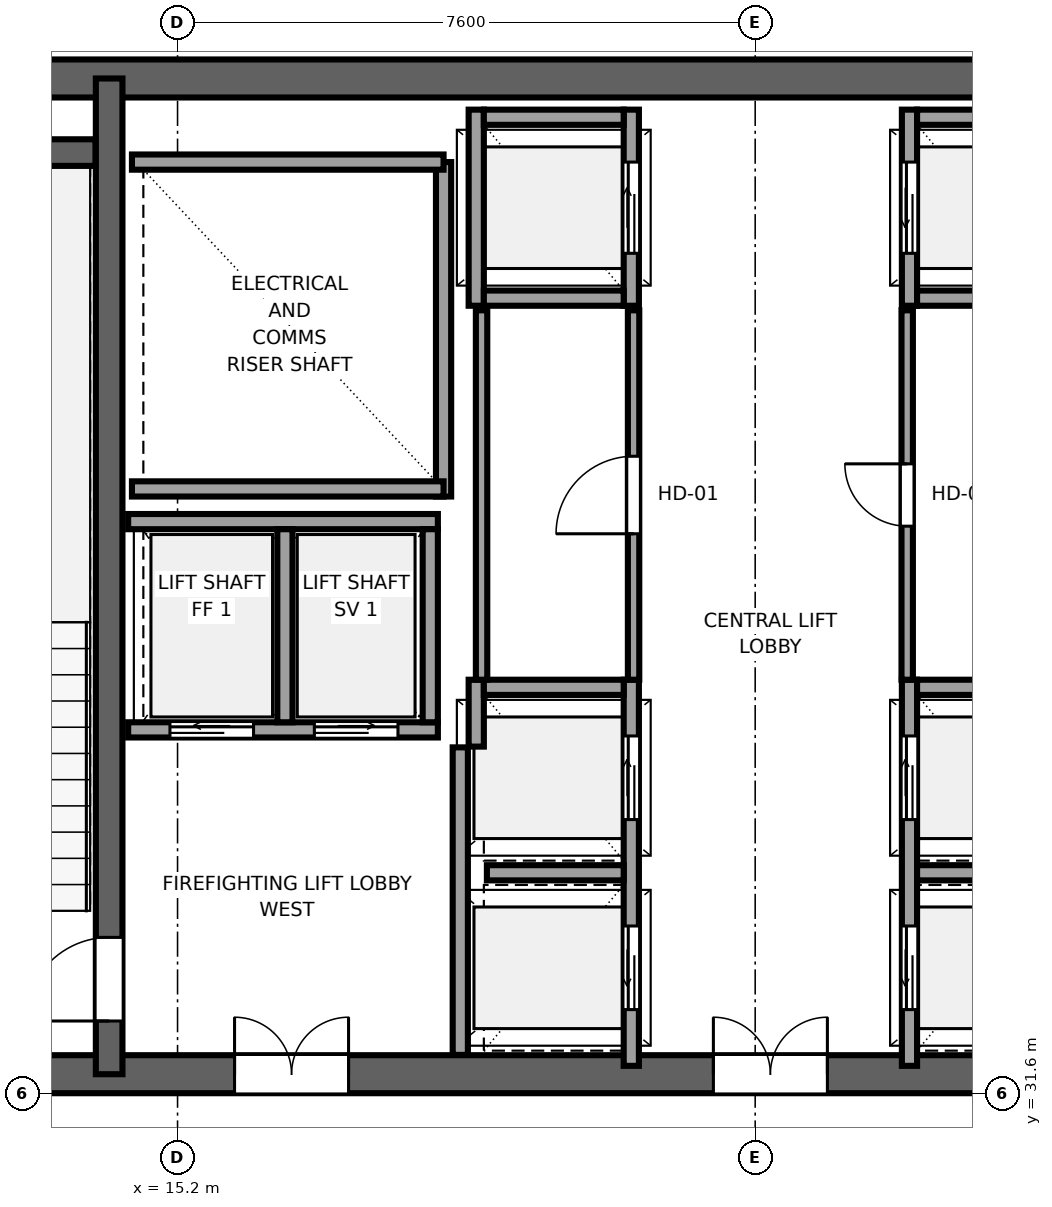
"""IFC4 building model, lengths in metres.
Left out: names, types, materials, properties, quantities, classifications, styles, units other than length and angle.
Written with IfcOpenShell. Run it as: python <this file> out.ifc"""

import sys

from ifc_helpers import new_model, si_unit, direction, frame, frame_2d, origin, place, context, subcontext, project, spatial, rectangle, extrude, source, transform, mapped, element, fill, save


model = new_model("IFC4")
c1 = context("Model", 3, precision=1e-05, world=origin(), true_north=direction((0.0, 1.0)))
c2 = subcontext(c1, "Body", "Model", "MODEL_VIEW")
j1 = project(units=[si_unit("LENGTHUNIT", "METRE"), si_unit("PLANEANGLEUNIT", "RADIAN")], contexts=[c1])
p1 = place(None, origin())
s1 = spatial("IfcSite", under=j1, at=p1, CompositionType="ELEMENT")
p2 = place(p1, origin())
s2 = spatial("IfcBuilding", under=s1, at=p2, CompositionType="ELEMENT")
p3 = place(p2, frame((0.0, 0.0, 282.15)))
s3 = spatial("IfcBuildingStorey", under=s2, at=p3, CompositionType="ELEMENT", Elevation=282.15)
p4 = place(p3, frame((10.0, 31.85, 0.0), z_axis=(0.0, 0.0, 1.0), x_axis=(1.0, 0.0, 0.0)))
e1 = element("IfcWall", 1, at=p4, inside=s3, PredefinedType="SHEAR", context=c2, shape_type="SweptSolid", body=[
    extrude(rectangle(XDim=26.0, YDim=0.5, at=frame_2d((13.0, 0.0))), origin(), (0.0, 0.0, 1.0), 4.4),
])
p5 = place(p4, frame((7.45, 0.0, 0.0), z_axis=(0.0, 0.0, 1.0), x_axis=(-1.0, 0.0, 0.0)))
e2 = element("IfcOpeningElement", 2, at=p5, cuts=e1, PredefinedType="OPENING", context=c2, shape_type="SweptSolid", body=[
    extrude(rectangle(XDim=1.5, YDim=2.04, at=frame_2d((0.75, 1.02))), frame((0.0, 0.26, 0.0), z_axis=(0.0, -1.0, 0.0), x_axis=(1.0, 0.0, 0.0)), (0.0, 0.0, 1.0), 0.52),
])
p6 = place(p4, frame((13.75, 0.0, 0.0), z_axis=(0.0, 0.0, 1.0), x_axis=(-1.0, 0.0, 0.0)))
e3 = element("IfcOpeningElement", 3, at=p6, cuts=e1, PredefinedType="OPENING", context=c2, shape_type="SweptSolid", body=[
    extrude(rectangle(XDim=1.5, YDim=2.04, at=frame_2d((0.75, 1.02))), frame((0.0, 0.26, 0.0), z_axis=(0.0, -1.0, 0.0), x_axis=(1.0, 0.0, 0.0)), (0.0, 0.0, 1.0), 0.52),
])
p7 = place(p4, frame((20.05, 0.0, 0.0), z_axis=(0.0, 0.0, 1.0), x_axis=(-1.0, 0.0, 0.0)))
e4 = element("IfcOpeningElement", 4, at=p7, cuts=e1, PredefinedType="OPENING", context=c2, shape_type="SweptSolid", body=[
    extrude(rectangle(XDim=1.5, YDim=2.04, at=frame_2d((0.75, 1.02))), frame((0.0, 0.26, 0.0), z_axis=(0.0, -1.0, 0.0), x_axis=(1.0, 0.0, 0.0)), (0.0, 0.0, 1.0), 0.52),
])
p8 = place(p3, frame((10.0, 44.95, 0.0), z_axis=(0.0, 0.0, 1.0), x_axis=(1.0, 0.0, 0.0)))
e5 = element("IfcWall", 5, at=p8, inside=s3, PredefinedType="SHEAR", context=c2, shape_type="SweptSolid", body=[
    extrude(rectangle(XDim=26.0, YDim=0.5, at=frame_2d((13.0, 0.0))), origin(), (0.0, 0.0, 1.0), 4.4),
])
p9 = place(p3, frame((14.3, 31.85, 0.0), z_axis=(0.0, 0.0, 1.0), x_axis=(0.0, 1.0, 0.0)))
e6 = element("IfcWall", 6, at=p9, inside=s3, PredefinedType="SHEAR", context=c2, shape_type="SweptSolid", body=[
    extrude(rectangle(XDim=13.1, YDim=0.35, at=frame_2d((6.55, 0.0))), origin(), (0.0, 0.0, 1.0), 4.4),
])
p10 = place(p9, frame((0.7, 0.0, 0.0)))
e7 = element("IfcOpeningElement", 7, at=p10, cuts=e6, PredefinedType="OPENING", context=c2, shape_type="SweptSolid", body=[
    extrude(rectangle(XDim=1.1, YDim=2.12, at=frame_2d((0.55, 1.06))), frame((0.0, 0.185, 0.0), z_axis=(0.0, -1.0, 0.0), x_axis=(1.0, 0.0, 0.0)), (0.0, 0.0, 1.0), 0.37),
])
p11 = place(p3, frame((10.52, 43.975, 0.0), z_axis=(0.0, 0.0, 1.0), x_axis=(1.0, 0.0, 0.0)))
e8 = element("IfcWall", 8, at=p11, inside=s3, PredefinedType="SHEAR", context=c2, shape_type="SweptSolid", body=[
    extrude(rectangle(XDim=3.6, YDim=0.35, at=frame_2d((1.8, 0.0))), origin(), (0.0, 0.0, 1.0), 4.4),
])
p12 = place(p3, frame((18.7, 39.45, 0.0), z_axis=(0.0, 0.0, 1.0), x_axis=(0.0, 1.0, 0.0)))
e9 = element("IfcWall", 9, at=p12, inside=s3, PredefinedType="SOLIDWALL", context=c2, shape_type="SweptSolid", body=[
    extrude(rectangle(XDim=4.4, YDim=0.2, at=frame_2d((2.2, 0.0))), origin(), (0.0, 0.0, 1.0), 4.18),
])
for number, where, z_axis, x_axis in (
    (10, (14.6, 39.55, 0.0), (0.0, 0.0, 1.0), (1.0, 0.0, 0.0)),
    (11, (14.6, 43.85, 0.0), (0.0, 0.0, 1.0), (1.0, 0.0, 0.0)),
):
    element("IfcWall", number, at=place(p3, frame(where, z_axis=z_axis, x_axis=x_axis)), inside=s3, PredefinedType="SOLIDWALL", context=c2, shape_type="SweptSolid", body=[
        extrude(rectangle(XDim=4.1, YDim=0.2, at=frame_2d((2.05, 0.0))), origin(), (0.0, 0.0, 1.0), 4.18),
    ])
p13 = place(p3, frame((18.92, 32.104, 0.0), z_axis=(0.0, 0.0, 1.0), x_axis=(0.0, 1.0, 0.0)))
e12 = element("IfcWall", 12, at=p13, inside=s3, PredefinedType="SOLIDWALL", context=c2, shape_type="SweptSolid", body=[
    extrude(rectangle(XDim=4.046, YDim=0.2, at=frame_2d((2.023, 0.0))), origin(), (0.0, 0.0, 1.0), 4.18),
])
p14 = place(p3, frame((21.17, 31.96, 0.0), z_axis=(0.0, 0.0, 1.0), x_axis=(0.0, 1.0, 0.0)))
e13 = element("IfcWall", 13, at=p14, inside=s3, PredefinedType="SOLIDWALL", context=c2, shape_type="SweptSolid", body=[
    extrude(rectangle(XDim=5.08, YDim=0.2, at=frame_2d((2.54, 0.0))), origin(), (0.0, 0.0, 1.0), 4.18),
])
p15 = place(p14, frame((0.74, 0.0, 0.0)))
e14 = element("IfcOpeningElement", 14, at=p15, cuts=e13, PredefinedType="OPENING", context=c2, shape_type="SweptSolid", body=[
    extrude(rectangle(XDim=1.1, YDim=2.12, at=frame_2d((0.55, 1.06))), frame((0.0, 0.11, 0.0), z_axis=(0.0, -1.0, 0.0), x_axis=(1.0, 0.0, 0.0)), (0.0, 0.0, 1.0), 0.22),
])
p16 = place(p14, frame((3.24, 0.0, 0.0)))
e15 = element("IfcOpeningElement", 15, at=p16, cuts=e13, PredefinedType="OPENING", context=c2, shape_type="SweptSolid", body=[
    extrude(rectangle(XDim=1.1, YDim=2.12, at=frame_2d((0.55, 1.06))), frame((0.0, 0.11, 0.0), z_axis=(0.0, -1.0, 0.0), x_axis=(1.0, 0.0, 0.0)), (0.0, 0.0, 1.0), 0.22),
])
p17 = place(p3, frame((19.13, 36.16, 0.0), z_axis=(0.0, 0.0, 1.0), x_axis=(0.0, 1.0, 0.0)))
e16 = element("IfcWall", 16, at=p17, inside=s3, PredefinedType="SOLIDWALL", context=c2, shape_type="SweptSolid", body=[
    extrude(rectangle(XDim=0.88, YDim=0.2, at=frame_2d((0.44, 0.0))), origin(), (0.0, 0.0, 1.0), 4.18),
])
p18 = place(p3, frame((19.23, 36.94, 0.0), z_axis=(0.0, 0.0, 1.0), x_axis=(1.0, 0.0, 0.0)))
e17 = element("IfcWall", 17, at=p18, inside=s3, PredefinedType="SOLIDWALL", context=c2, shape_type="SweptSolid", body=[
    extrude(rectangle(XDim=1.84, YDim=0.2, at=frame_2d((0.92, 0.0))), origin(), (0.0, 0.0, 1.0), 4.18),
])
p19 = place(p3, frame((19.27, 34.5, 0.0), z_axis=(0.0, 0.0, 1.0), x_axis=(1.0, 0.0, 0.0)))
e18 = element("IfcWall", 18, at=p19, inside=s3, PredefinedType="SOLIDWALL", context=c2, shape_type="SweptSolid", body=[
    extrude(rectangle(XDim=1.8, YDim=0.2, at=frame_2d((0.9, 0.0))), origin(), (0.0, 0.0, 1.0), 4.18),
])
p20 = place(p3, frame((21.17, 41.96, 0.0), z_axis=(0.0, 0.0, 1.0), x_axis=(0.0, 1.0, 0.0)))
e19 = element("IfcWall", 19, at=p20, inside=s3, PredefinedType="SOLIDWALL", context=c2, shape_type="SweptSolid", body=[
    extrude(rectangle(XDim=2.58, YDim=0.2, at=frame_2d((1.29, 0.0))), origin(), (0.0, 0.0, 1.0), 4.18),
])
p21 = place(p20, frame((0.69, 0.0, 0.0)))
e20 = element("IfcOpeningElement", 20, at=p21, cuts=e19, PredefinedType="OPENING", context=c2, shape_type="SweptSolid", body=[
    extrude(rectangle(XDim=1.2, YDim=2.15, at=frame_2d((0.6, 1.075))), frame((0.0, 0.11, 0.0), z_axis=(0.0, -1.0, 0.0), x_axis=(1.0, 0.0, 0.0)), (0.0, 0.0, 1.0), 0.22),
])
p22 = place(p3, frame((19.13, 41.96, 0.0), z_axis=(0.0, 0.0, 1.0), x_axis=(0.0, 1.0, 0.0)))
e21 = element("IfcWall", 21, at=p22, inside=s3, PredefinedType="SOLIDWALL", context=c2, shape_type="SweptSolid", body=[
    extrude(rectangle(XDim=2.58, YDim=0.2, at=frame_2d((1.29, 0.0))), origin(), (0.0, 0.0, 1.0), 4.18),
])
for number, where, z_axis, x_axis in (
    (22, (19.23, 42.06, 0.0), (0.0, 0.0, 1.0), (1.0, 0.0, 0.0)),
    (23, (19.23, 44.44, 0.0), (0.0, 0.0, 1.0), (1.0, 0.0, 0.0)),
):
    element("IfcWall", number, at=place(p3, frame(where, z_axis=z_axis, x_axis=x_axis)), inside=s3, PredefinedType="SOLIDWALL", context=c2, shape_type="SweptSolid", body=[
        extrude(rectangle(XDim=1.84, YDim=0.2, at=frame_2d((0.92, 0.0))), origin(), (0.0, 0.0, 1.0), 4.18),
    ])
p23 = place(p3, frame((14.55, 36.38, 0.0), z_axis=(0.0, 0.0, 1.0), x_axis=(1.0, 0.0, 0.0)))
e24 = element("IfcWall", 24, at=p23, inside=s3, PredefinedType="SOLIDWALL", context=c2, shape_type="SweptSolid", body=[
    extrude(rectangle(XDim=4.075, YDim=0.2, at=frame_2d((2.038, 0.0))), origin(), (0.0, 0.0, 1.0), 4.18),
])
p24 = place(p23, frame((0.55, 0.0, 0.0)))
e25 = element("IfcOpeningElement", 25, at=p24, cuts=e24, PredefinedType="OPENING", context=c2, shape_type="SweptSolid", body=[
    extrude(rectangle(XDim=1.1, YDim=2.12, at=frame_2d((0.55, 1.06))), frame((0.0, 0.11, 0.0), z_axis=(0.0, -1.0, 0.0), x_axis=(1.0, 0.0, 0.0)), (0.0, 0.0, 1.0), 0.22),
])
p25 = place(p23, frame((2.45, 0.0, 0.0)))
e26 = element("IfcOpeningElement", 26, at=p25, cuts=e24, PredefinedType="OPENING", context=c2, shape_type="SweptSolid", body=[
    extrude(rectangle(XDim=1.1, YDim=2.12, at=frame_2d((0.55, 1.06))), frame((0.0, 0.11, 0.0), z_axis=(0.0, -1.0, 0.0), x_axis=(1.0, 0.0, 0.0)), (0.0, 0.0, 1.0), 0.22),
])
p26 = place(p3, frame((14.55, 39.12, 0.0), z_axis=(0.0, 0.0, 1.0), x_axis=(1.0, 0.0, 0.0)))
e27 = element("IfcWall", 27, at=p26, inside=s3, PredefinedType="SOLIDWALL", context=c2, shape_type="SweptSolid", body=[
    extrude(rectangle(XDim=4.075, YDim=0.2, at=frame_2d((2.038, 0.0))), origin(), (0.0, 0.0, 1.0), 4.18),
])
for number, where, z_axis, x_axis in (
    (28, (18.525, 36.48, 0.0), (0.0, 0.0, 1.0), (0.0, 1.0, 0.0)),
    (29, (16.613, 36.48, 0.0), (0.0, 0.0, 1.0), (0.0, 1.0, 0.0)),
):
    element("IfcWall", number, at=place(p3, frame(where, z_axis=z_axis, x_axis=x_axis)), inside=s3, PredefinedType="SOLIDWALL", context=c2, shape_type="SweptSolid", body=[
        extrude(rectangle(XDim=2.54, YDim=0.2, at=frame_2d((1.27, 0.0))), origin(), (0.0, 0.0, 1.0), 4.18),
    ])
p27 = place(p3, frame((24.83, 31.96, 0.0), z_axis=(0.0, 0.0, 1.0), x_axis=(0.0, 1.0, 0.0)))
e30 = element("IfcWall", 30, at=p27, inside=s3, PredefinedType="SOLIDWALL", context=c2, shape_type="SweptSolid", body=[
    extrude(rectangle(XDim=5.08, YDim=0.2, at=frame_2d((2.54, 0.0))), origin(), (0.0, 0.0, 1.0), 4.18),
])
p28 = place(p27, frame((0.74, 0.0, 0.0)))
e31 = element("IfcOpeningElement", 31, at=p28, cuts=e30, PredefinedType="OPENING", context=c2, shape_type="SweptSolid", body=[
    extrude(rectangle(XDim=1.1, YDim=2.12, at=frame_2d((0.55, 1.06))), frame((0.0, 0.11, 0.0), z_axis=(0.0, -1.0, 0.0), x_axis=(1.0, 0.0, 0.0)), (0.0, 0.0, 1.0), 0.22),
])
p29 = place(p27, frame((3.24, 0.0, 0.0)))
e32 = element("IfcOpeningElement", 32, at=p29, cuts=e30, PredefinedType="OPENING", context=c2, shape_type="SweptSolid", body=[
    extrude(rectangle(XDim=1.1, YDim=2.12, at=frame_2d((0.55, 1.06))), frame((0.0, 0.11, 0.0), z_axis=(0.0, -1.0, 0.0), x_axis=(1.0, 0.0, 0.0)), (0.0, 0.0, 1.0), 0.22),
])
p30 = place(p3, frame((24.93, 36.94, 0.0), z_axis=(0.0, 0.0, 1.0), x_axis=(1.0, 0.0, 0.0)))
e33 = element("IfcWall", 33, at=p30, inside=s3, PredefinedType="SOLIDWALL", context=c2, shape_type="SweptSolid", body=[
    extrude(rectangle(XDim=1.84, YDim=0.2, at=frame_2d((0.92, 0.0))), origin(), (0.0, 0.0, 1.0), 4.18),
])
p31 = place(p3, frame((24.93, 34.5, 0.0), z_axis=(0.0, 0.0, 1.0), x_axis=(1.0, 0.0, 0.0)))
e34 = element("IfcWall", 34, at=p31, inside=s3, PredefinedType="SOLIDWALL", context=c2, shape_type="SweptSolid", body=[
    extrude(rectangle(XDim=1.8, YDim=0.2, at=frame_2d((0.9, 0.0))), origin(), (0.0, 0.0, 1.0), 4.18),
])
p32 = place(p3, frame((24.83, 41.96, 0.0), z_axis=(0.0, 0.0, 1.0), x_axis=(0.0, 1.0, 0.0)))
e35 = element("IfcWall", 35, at=p32, inside=s3, PredefinedType="SOLIDWALL", context=c2, shape_type="SweptSolid", body=[
    extrude(rectangle(XDim=2.58, YDim=0.2, at=frame_2d((1.29, 0.0))), origin(), (0.0, 0.0, 1.0), 4.18),
])
p33 = place(p32, frame((0.69, 0.0, 0.0)))
e36 = element("IfcOpeningElement", 36, at=p33, cuts=e35, PredefinedType="OPENING", context=c2, shape_type="SweptSolid", body=[
    extrude(rectangle(XDim=1.2, YDim=2.15, at=frame_2d((0.6, 1.075))), frame((0.0, 0.11, 0.0), z_axis=(0.0, -1.0, 0.0), x_axis=(1.0, 0.0, 0.0)), (0.0, 0.0, 1.0), 0.22),
])
for number, where, z_axis, x_axis in (
    (37, (24.93, 42.06, 0.0), (0.0, 0.0, 1.0), (1.0, 0.0, 0.0)),
    (38, (24.93, 44.44, 0.0), (0.0, 0.0, 1.0), (1.0, 0.0, 0.0)),
):
    element("IfcWall", number, at=place(p3, frame(where, z_axis=z_axis, x_axis=x_axis)), inside=s3, PredefinedType="SOLIDWALL", context=c2, shape_type="SweptSolid", body=[
        extrude(rectangle(XDim=1.84, YDim=0.2, at=frame_2d((0.92, 0.0))), origin(), (0.0, 0.0, 1.0), 4.18),
    ])
p34 = place(p3, frame((19.2, 37.04, 0.0), z_axis=(0.0, 0.0, 1.0), x_axis=(0.0, 1.0, 0.0)))
e39 = element("IfcWall", 39, at=p34, inside=s3, PredefinedType="PARTITIONING", context=c2, shape_type="SweptSolid", body=[
    extrude(rectangle(XDim=4.86, YDim=0.15, at=frame_2d((2.43, 0.0))), origin(), (0.0, 0.0, 1.0), 4.18),
])
p35 = place(p3, frame((21.2, 37.04, 0.0), z_axis=(0.0, 0.0, 1.0), x_axis=(0.0, 1.0, 0.0)))
e40 = element("IfcWall", 40, at=p35, inside=s3, PredefinedType="PARTITIONING", context=c2, shape_type="SweptSolid", body=[
    extrude(rectangle(XDim=4.86, YDim=0.15, at=frame_2d((2.43, 0.0))), origin(), (0.0, 0.0, 1.0), 4.18),
])
p36 = place(p35, frame((1.92, 0.0, 0.0)))
e41 = element("IfcOpeningElement", 41, at=p36, cuts=e40, PredefinedType="OPENING", context=c2, shape_type="SweptSolid", body=[
    extrude(rectangle(XDim=1.02, YDim=2.03, at=frame_2d((0.51, 1.015))), frame((0.0, 0.085, 0.0), z_axis=(0.0, -1.0, 0.0), x_axis=(1.0, 0.0, 0.0)), (0.0, 0.0, 1.0), 0.17),
])
p37 = place(p3, frame((24.8, 37.04, 0.0), z_axis=(0.0, 0.0, 1.0), x_axis=(0.0, 1.0, 0.0)))
e42 = element("IfcWall", 42, at=p37, inside=s3, PredefinedType="PARTITIONING", context=c2, shape_type="SweptSolid", body=[
    extrude(rectangle(XDim=4.86, YDim=0.15, at=frame_2d((2.43, 0.0))), origin(), (0.0, 0.0, 1.0), 4.18),
])
p38 = place(p37, frame((2.02, 0.0, 0.0)))
e43 = element("IfcOpeningElement", 43, at=p38, cuts=e42, PredefinedType="OPENING", context=c2, shape_type="SweptSolid", body=[
    extrude(rectangle(XDim=0.82, YDim=2.01, at=frame_2d((0.41, 1.005))), frame((0.0, 0.085, 0.0), z_axis=(0.0, -1.0, 0.0), x_axis=(1.0, 0.0, 0.0)), (0.0, 0.0, 1.0), 0.17),
])
m1 = source(origin(), c2, "Body", "SweptSolid", [
    extrude(rectangle(XDim=1.1, YDim=2.12, at=frame_2d((0.55, 1.06))), frame((0.0, 0.025, 0.0), z_axis=(0.0, -1.0, 0.0), x_axis=(1.0, 0.0, 0.0)), (0.0, 0.0, 1.0), 0.05),
])
p39 = place(p10, origin())
e44 = element("IfcDoor", 44, at=p39, inside=s3, OperationType="SINGLE_SWING_LEFT", PredefinedType="DOOR", context=c2, shape_type="MappedRepresentation", body=[
    mapped(m1, transform((0.0, 0.0, 0.0), x_axis=(1.0, 0.0, 0.0), y_axis=(0.0, 1.0, 0.0), z_axis=(0.0, 0.0, 1.0), scale=1.0)),
])
fill(e7, e44)
m2 = source(origin(), c2, "Body", "SweptSolid", [
    extrude(rectangle(XDim=1.5, YDim=2.04, at=frame_2d((0.75, 1.02))), frame((0.0, 0.025, 0.0), z_axis=(0.0, -1.0, 0.0), x_axis=(1.0, 0.0, 0.0)), (0.0, 0.0, 1.0), 0.05),
])
p40 = place(p5, origin())
e45 = element("IfcDoor", 45, at=p40, inside=s3, OperationType="DOUBLE_DOOR_SINGLE_SWING", PredefinedType="DOOR", context=c2, shape_type="MappedRepresentation", body=[
    mapped(m2, transform((0.0, 0.0, 0.0), x_axis=(1.0, 0.0, 0.0), y_axis=(0.0, 1.0, 0.0), z_axis=(0.0, 0.0, 1.0), scale=1.0)),
])
fill(e2, e45)
p41 = place(p6, origin())
e46 = element("IfcDoor", 46, at=p41, inside=s3, OperationType="DOUBLE_DOOR_SINGLE_SWING", PredefinedType="DOOR", context=c2, shape_type="MappedRepresentation", body=[
    mapped(m2, transform((0.0, 0.0, 0.0), x_axis=(1.0, 0.0, 0.0), y_axis=(0.0, 1.0, 0.0), z_axis=(0.0, 0.0, 1.0), scale=1.0)),
])
fill(e3, e46)
m3 = source(origin(), c2, "Body", "SweptSolid", [
    extrude(rectangle(XDim=1.1, YDim=2.12, at=frame_2d((0.55, 1.06))), frame((0.0, 0.025, 0.0), z_axis=(0.0, -1.0, 0.0), x_axis=(1.0, 0.0, 0.0)), (0.0, 0.0, 1.0), 0.05),
])
p42 = place(p15, origin())
e47 = element("IfcDoor", 47, at=p42, inside=s3, OperationType="SLIDING_TO_LEFT", PredefinedType="DOOR", context=c2, shape_type="MappedRepresentation", body=[
    mapped(m3, transform((0.0, 0.0, 0.0), x_axis=(1.0, 0.0, 0.0), y_axis=(0.0, 1.0, 0.0), z_axis=(0.0, 0.0, 1.0), scale=1.0)),
])
fill(e14, e47)
p43 = place(p16, origin())
e48 = element("IfcDoor", 48, at=p43, inside=s3, OperationType="SLIDING_TO_RIGHT", PredefinedType="DOOR", context=c2, shape_type="MappedRepresentation", body=[
    mapped(m3, transform((0.0, 0.0, 0.0), x_axis=(1.0, 0.0, 0.0), y_axis=(0.0, 1.0, 0.0), z_axis=(0.0, 0.0, 1.0), scale=1.0)),
])
fill(e15, e48)
m4 = source(origin(), c2, "Body", "SweptSolid", [
    extrude(rectangle(XDim=1.2, YDim=2.15, at=frame_2d((0.6, 1.075))), frame((0.0, 0.025, 0.0), z_axis=(0.0, -1.0, 0.0), x_axis=(1.0, 0.0, 0.0)), (0.0, 0.0, 1.0), 0.05),
])
p44 = place(p21, origin())
e49 = element("IfcDoor", 49, at=p44, inside=s3, OperationType="SLIDING_TO_RIGHT", PredefinedType="DOOR", context=c2, shape_type="MappedRepresentation", body=[
    mapped(m4, transform((0.0, 0.0, 0.0), x_axis=(1.0, 0.0, 0.0), y_axis=(0.0, 1.0, 0.0), z_axis=(0.0, 0.0, 1.0), scale=1.0)),
])
fill(e20, e49)
p45 = place(p24, origin())
e50 = element("IfcDoor", 50, at=p45, inside=s3, OperationType="SLIDING_TO_LEFT", PredefinedType="DOOR", context=c2, shape_type="MappedRepresentation", body=[
    mapped(m3, transform((0.0, 0.0, 0.0), x_axis=(1.0, 0.0, 0.0), y_axis=(0.0, 1.0, 0.0), z_axis=(0.0, 0.0, 1.0), scale=1.0)),
])
fill(e25, e50)
p46 = place(p25, origin())
e51 = element("IfcDoor", 51, at=p46, inside=s3, OperationType="SLIDING_TO_RIGHT", PredefinedType="DOOR", context=c2, shape_type="MappedRepresentation", body=[
    mapped(m3, transform((0.0, 0.0, 0.0), x_axis=(1.0, 0.0, 0.0), y_axis=(0.0, 1.0, 0.0), z_axis=(0.0, 0.0, 1.0), scale=1.0)),
])
fill(e26, e51)
p47 = place(p28, origin())
e52 = element("IfcDoor", 52, at=p47, inside=s3, OperationType="SLIDING_TO_LEFT", PredefinedType="DOOR", context=c2, shape_type="MappedRepresentation", body=[
    mapped(m3, transform((0.0, 0.0, 0.0), x_axis=(1.0, 0.0, 0.0), y_axis=(0.0, 1.0, 0.0), z_axis=(0.0, 0.0, 1.0), scale=1.0)),
])
fill(e31, e52)
p48 = place(p29, origin())
e53 = element("IfcDoor", 53, at=p48, inside=s3, OperationType="SLIDING_TO_RIGHT", PredefinedType="DOOR", context=c2, shape_type="MappedRepresentation", body=[
    mapped(m3, transform((0.0, 0.0, 0.0), x_axis=(1.0, 0.0, 0.0), y_axis=(0.0, 1.0, 0.0), z_axis=(0.0, 0.0, 1.0), scale=1.0)),
])
fill(e32, e53)
p49 = place(p33, origin())
e54 = element("IfcDoor", 54, at=p49, inside=s3, OperationType="SLIDING_TO_LEFT", PredefinedType="DOOR", context=c2, shape_type="MappedRepresentation", body=[
    mapped(m4, transform((0.0, 0.0, 0.0), x_axis=(1.0, 0.0, 0.0), y_axis=(0.0, 1.0, 0.0), z_axis=(0.0, 0.0, 1.0), scale=1.0)),
])
fill(e36, e54)
m5 = source(origin(), c2, "Body", "SweptSolid", [
    extrude(rectangle(XDim=1.02, YDim=2.03, at=frame_2d((0.51, 1.015))), frame((0.0, 0.025, 0.0), z_axis=(0.0, -1.0, 0.0), x_axis=(1.0, 0.0, 0.0)), (0.0, 0.0, 1.0), 0.05),
])
p50 = place(p36, origin())
e55 = element("IfcDoor", 55, at=p50, inside=s3, OperationType="SINGLE_SWING_LEFT", PredefinedType="DOOR", context=c2, shape_type="MappedRepresentation", body=[
    mapped(m5, transform((0.0, 0.0, 0.0), x_axis=(1.0, 0.0, 0.0), y_axis=(0.0, 1.0, 0.0), z_axis=(0.0, 0.0, 1.0), scale=1.0)),
])
fill(e41, e55)
m6 = source(origin(), c2, "Body", "SweptSolid", [
    extrude(rectangle(XDim=0.82, YDim=2.01, at=frame_2d((0.41, 1.005))), frame((0.0, 0.025, 0.0), z_axis=(0.0, -1.0, 0.0), x_axis=(1.0, 0.0, 0.0)), (0.0, 0.0, 1.0), 0.05),
])
p51 = place(p38, origin())
e56 = element("IfcDoor", 56, at=p51, inside=s3, OperationType="SINGLE_SWING_RIGHT", PredefinedType="DOOR", context=c2, shape_type="MappedRepresentation", body=[
    mapped(m6, transform((0.0, 0.0, 0.0), x_axis=(1.0, 0.0, 0.0), y_axis=(0.0, 1.0, 0.0), z_axis=(0.0, 0.0, 1.0), scale=1.0)),
])
fill(e43, e56)
save(model, sys.argv[1])
